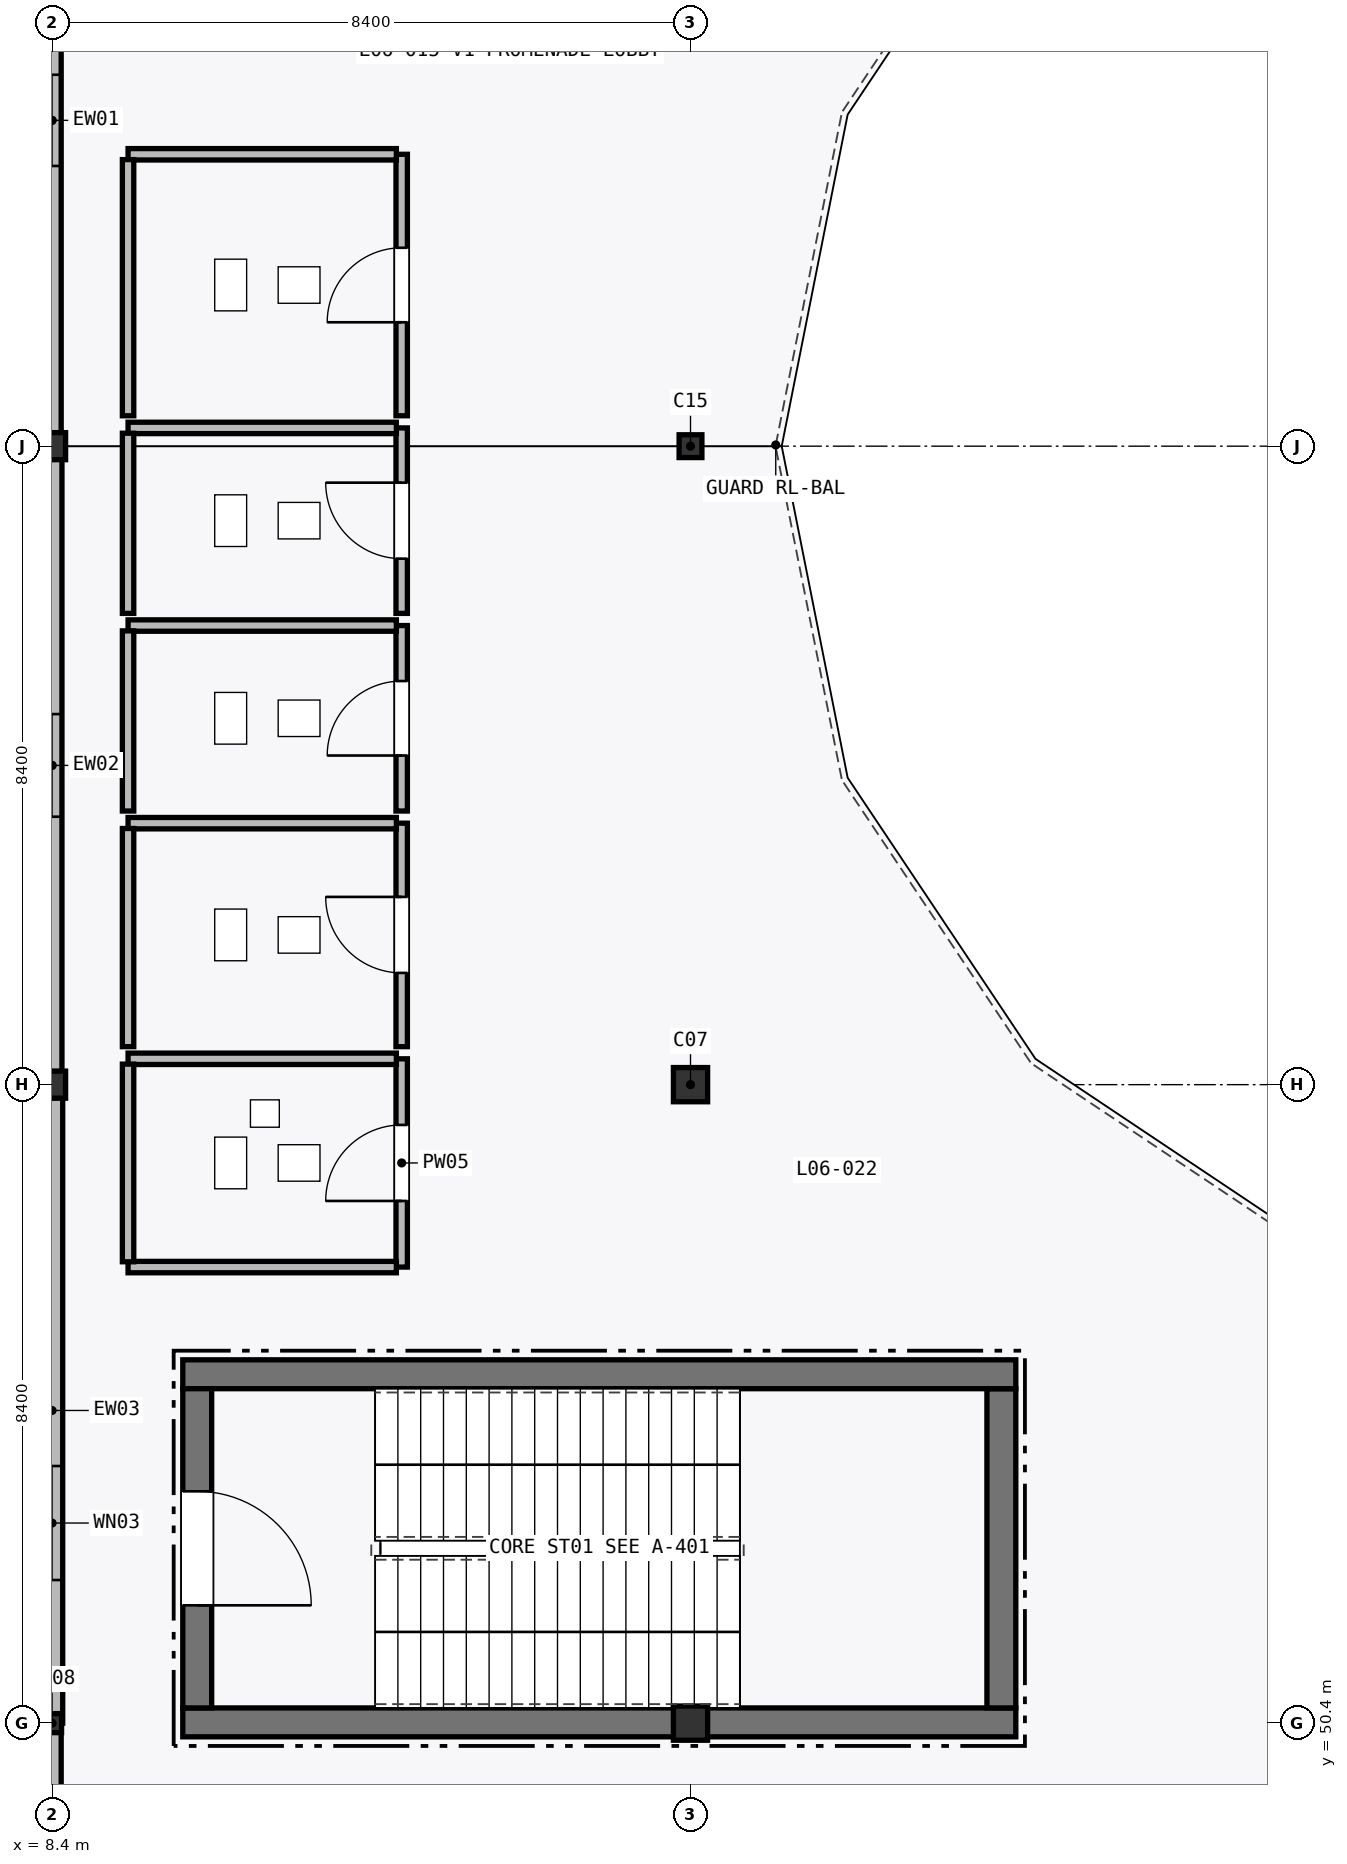
"""IFC4 building model, lengths in metres.
Left out: names, types, materials, properties, quantities, classifications, styles, units other than length and angle.
Written with IfcOpenShell. Run it as: python <this file> out.ifc"""

import sys

from ifc_helpers import new_model, si_unit, direction, frame, frame_2d, origin, origin_2d, place, context, subcontext, project, spatial, rectangle, hollow_rectangle, hollow_circle, i_section, extrude, element, fill, save


model = new_model("IFC4")
c1 = context("Model", 3, precision=1e-05, world=origin(), true_north=direction((0.0, 1.0)))
c2 = subcontext(c1, "Body", "Model", "MODEL_VIEW")
j1 = project(units=[si_unit("LENGTHUNIT", "METRE"), si_unit("PLANEANGLEUNIT", "RADIAN")], contexts=[c1])
p1 = place(None, origin())
s1 = spatial("IfcSite", under=j1, at=p1, CompositionType="ELEMENT")
p2 = place(p1, origin())
s2 = spatial("IfcBuilding", under=s1, at=p2, CompositionType="ELEMENT")
p3 = place(p2, frame((0.0, 0.0, 26.7)))
s3 = spatial("IfcBuildingStorey", under=s2, at=p3, CompositionType="ELEMENT", Elevation=26.7)
p4 = place(p3, frame((8.4, 50.4, 0.0), z_axis=(0.0, 0.0, 1.0), x_axis=(1.0, 0.0, 0.0)))
e1 = element("IfcColumn", 1, at=p4, inside=s3, PredefinedType="COLUMN", context=c2, shape_type="SweptSolid", body=[
    extrude(i_section(OverallWidth=0.25, OverallDepth=0.25, WebThickness=0.009, FlangeThickness=0.014, FilletRadius=0.016, at=origin_2d()), origin(), (0.0, 0.0, 1.0), 5.1),
])
for number, where, z_axis, x_axis in (
    (2, (8.4, 58.8, 0.0), (0.0, 0.0, 1.0), (1.0, 0.0, 0.0)),
    (3, (8.4, 67.2, 0.0), (0.0, 0.0, 1.0), (1.0, 0.0, 0.0)),
):
    element("IfcColumn", number, at=place(p3, frame(where, z_axis=z_axis, x_axis=x_axis)), inside=s3, PredefinedType="COLUMN", context=c2, shape_type="SweptSolid", body=[
        extrude(hollow_circle(Radius=0.178, WallThickness=0.014, at=origin_2d()), origin(), (0.0, 0.0, 1.0), 5.1),
    ])
for number, where, z_axis, x_axis in (
    (4, (16.8, 50.4, 0.0), (0.0, 0.0, 1.0), (1.0, 0.0, 0.0)),
    (5, (16.8, 58.8, 0.0), (0.0, 0.0, 1.0), (1.0, 0.0, 0.0)),
):
    element("IfcColumn", number, at=place(p3, frame(where, z_axis=z_axis, x_axis=x_axis)), inside=s3, PredefinedType="COLUMN", context=c2, shape_type="SweptSolid", body=[
        extrude(hollow_rectangle(XDim=0.45, YDim=0.45, WallThickness=0.018, at=origin_2d()), origin(), (0.0, 0.0, 1.0), 5.1),
    ])
p5 = place(p3, frame((16.8, 67.2, 0.0), z_axis=(0.0, 0.0, 1.0), x_axis=(1.0, 0.0, 0.0)))
e6 = element("IfcColumn", 6, at=p5, inside=s3, PredefinedType="COLUMN", context=c2, shape_type="SweptSolid", body=[
    extrude(i_section(OverallWidth=0.3, OverallDepth=0.3, WebThickness=0.01, FlangeThickness=0.015, FilletRadius=0.018, at=origin_2d()), origin(), (0.0, 0.0, 1.0), 5.1),
])
p6 = place(p3, frame((8.4, 75.6, 0.0), z_axis=(0.0, 0.0, 1.0), x_axis=(0.0, -1.0, 0.0)))
e7 = element("IfcWall", 7, at=p6, inside=s3, PredefinedType="STANDARD", context=c2, shape_type="SweptSolid", body=[
    extrude(rectangle(XDim=8.227, YDim=0.24, at=frame_2d((4.114, 0.0))), origin(), (0.0, 0.0, 1.0), 4.487),
])
p7 = place(p6, frame((3.513, 0.0, 0.95)))
e8 = element("IfcOpeningElement", 8, at=p7, cuts=e7, PredefinedType="OPENING", context=c2, shape_type="SweptSolid", body=[
    extrude(rectangle(XDim=1.2, YDim=1.8, at=frame_2d((0.6, 0.9))), frame((0.0, 0.13, 0.0), z_axis=(0.0, -1.0, 0.0), x_axis=(1.0, 0.0, 0.0)), (0.0, 0.0, 1.0), 0.26),
])
p8 = place(p3, frame((8.4, 67.027, 0.0), z_axis=(0.0, 0.0, 1.0), x_axis=(0.0, -1.0, 0.0)))
e9 = element("IfcWall", 9, at=p8, inside=s3, PredefinedType="STANDARD", context=c2, shape_type="SweptSolid", body=[
    extrude(rectangle(XDim=8.054, YDim=0.26, at=frame_2d((4.027, 0.0))), origin(), (0.0, 0.0, 1.0), 4.487),
])
p9 = place(p8, frame((3.352, 0.0, 0.95)))
e10 = element("IfcOpeningElement", 10, at=p9, cuts=e9, PredefinedType="OPENING", context=c2, shape_type="SweptSolid", body=[
    extrude(rectangle(XDim=1.35, YDim=1.8, at=frame_2d((0.675, 0.9))), frame((0.0, 0.14, 0.0), z_axis=(0.0, -1.0, 0.0), x_axis=(1.0, 0.0, 0.0)), (0.0, 0.0, 1.0), 0.28),
])
p10 = place(p3, frame((8.4, 58.627, 0.0), z_axis=(0.0, 0.0, 1.0), x_axis=(0.0, -1.0, 0.0)))
e11 = element("IfcWall", 11, at=p10, inside=s3, PredefinedType="STANDARD", context=c2, shape_type="SweptSolid", body=[
    extrude(rectangle(XDim=8.227, YDim=0.28, at=frame_2d((4.114, 0.0))), origin(), (0.0, 0.0, 1.0), 4.487),
])
p11 = place(p10, frame((4.844, 0.0, 0.95)))
e12 = element("IfcOpeningElement", 12, at=p11, cuts=e11, PredefinedType="OPENING", context=c2, shape_type="SweptSolid", body=[
    extrude(rectangle(XDim=1.5, YDim=1.8, at=frame_2d((0.75, 0.9))), frame((0.0, 0.15, 0.0), z_axis=(0.0, -1.0, 0.0), x_axis=(1.0, 0.0, 0.0)), (0.0, 0.0, 1.0), 0.3),
])
p12 = place(p3, frame((8.4, 50.4, 0.0), z_axis=(0.0, 0.0, 1.0), x_axis=(0.0, -1.0, 0.0)))
e13 = element("IfcWall", 13, at=p12, inside=s3, PredefinedType="STANDARD", context=c2, shape_type="SweptSolid", body=[
    extrude(rectangle(XDim=8.227, YDim=0.24, at=frame_2d((4.113, 0.0))), origin(), (0.0, 0.0, 1.0), 4.487),
])
p13 = place(p12, frame((3.273, 0.0, 0.95)))
e14 = element("IfcOpeningElement", 14, at=p13, cuts=e13, PredefinedType="OPENING", context=c2, shape_type="SweptSolid", body=[
    extrude(rectangle(XDim=1.68, YDim=1.8, at=frame_2d((0.84, 0.9))), frame((0.0, 0.13, 0.0), z_axis=(0.0, -1.0, 0.0), x_axis=(1.0, 0.0, 0.0)), (0.0, 0.0, 1.0), 0.26),
])
p14 = place(p3, frame((10.12, 50.41, 0.0), z_axis=(0.0, 0.0, 1.0), x_axis=(1.0, 0.0, 0.0)))
e15 = element("IfcWall", 15, at=p14, inside=s3, PredefinedType="SHEAR", context=c2, shape_type="SweptSolid", body=[
    extrude(rectangle(XDim=10.96, YDim=0.38, at=frame_2d((5.48, 0.0))), origin(), (0.0, 0.0, 1.0), 4.845),
])
p15 = place(p3, frame((20.89, 50.6, 0.0), z_axis=(0.0, 0.0, 1.0), x_axis=(0.0, 1.0, 0.0)))
e16 = element("IfcWall", 16, at=p15, inside=s3, PredefinedType="SHEAR", context=c2, shape_type="SweptSolid", body=[
    extrude(rectangle(XDim=4.2, YDim=0.38, at=frame_2d((2.1, 0.0))), origin(), (0.0, 0.0, 1.0), 4.845),
])
p16 = place(p3, frame((21.08, 54.99, 0.0), z_axis=(0.0, 0.0, 1.0), x_axis=(-1.0, 0.0, 0.0)))
e17 = element("IfcWall", 17, at=p16, inside=s3, PredefinedType="SHEAR", context=c2, shape_type="SweptSolid", body=[
    extrude(rectangle(XDim=10.96, YDim=0.38, at=frame_2d((5.48, 0.0))), origin(), (0.0, 0.0, 1.0), 4.845),
])
p17 = place(p3, frame((10.31, 54.8, 0.0), z_axis=(0.0, 0.0, 1.0), x_axis=(0.0, -1.0, 0.0)))
e18 = element("IfcWall", 18, at=p17, inside=s3, PredefinedType="SHEAR", context=c2, shape_type="SweptSolid", body=[
    extrude(rectangle(XDim=4.2, YDim=0.38, at=frame_2d((2.1, 0.0))), origin(), (0.0, 0.0, 1.0), 4.845),
])
p18 = place(p17, frame((1.35, 0.0, 0.0)))
e19 = element("IfcOpeningElement", 19, at=p18, cuts=e18, PredefinedType="OPENING", context=c2, shape_type="SweptSolid", body=[
    extrude(rectangle(XDim=1.5, YDim=2.15, at=frame_2d((0.75, 1.075))), frame((0.0, 0.2, 0.0), z_axis=(0.0, -1.0, 0.0), x_axis=(1.0, 0.0, 0.0)), (0.0, 0.0, 1.0), 0.4),
])
p19 = place(p3, frame((13.0, 56.4, 0.0), z_axis=(0.0, 0.0, 1.0), x_axis=(0.0, 1.0, 0.0)))
e20 = element("IfcWall", 20, at=p19, inside=s3, PredefinedType="PARTITIONING", context=c2, shape_type="SweptSolid", body=[
    extrude(rectangle(XDim=2.74, YDim=0.15, at=frame_2d((1.37, 0.0))), origin(), (0.0, 0.0, 1.0), 4.845),
])
p20 = place(p19, frame((0.87, 0.0, 0.0)))
e21 = element("IfcOpeningElement", 21, at=p20, cuts=e20, PredefinedType="OPENING", context=c2, shape_type="SweptSolid", body=[
    extrude(rectangle(XDim=1.0, YDim=2.1, at=frame_2d((0.5, 1.05))), frame((0.0, 0.085, 0.0), z_axis=(0.0, -1.0, 0.0), x_axis=(1.0, 0.0, 0.0)), (0.0, 0.0, 1.0), 0.17),
])
p21 = place(p3, frame((9.4, 56.4, 0.0), z_axis=(0.0, 0.0, 1.0), x_axis=(1.0, 0.0, 0.0)))
e22 = element("IfcWall", 22, at=p21, inside=s3, PredefinedType="PARTITIONING", context=c2, shape_type="SweptSolid", body=[
    extrude(rectangle(XDim=3.53, YDim=0.15, at=frame_2d((1.765, 0.0))), origin(), (0.0, 0.0, 1.0), 4.845),
])
p22 = place(p3, frame((12.93, 59.14, 0.0), z_axis=(0.0, 0.0, 1.0), x_axis=(-1.0, 0.0, 0.0)))
e23 = element("IfcWall", 23, at=p22, inside=s3, PredefinedType="PARTITIONING", context=c2, shape_type="SweptSolid", body=[
    extrude(rectangle(XDim=3.53, YDim=0.15, at=frame_2d((1.765, 0.0))), origin(), (0.0, 0.0, 1.0), 4.045),
])
p23 = place(p3, frame((9.4, 59.07, 0.0), z_axis=(0.0, 0.0, 1.0), x_axis=(0.0, -1.0, 0.0)))
e24 = element("IfcWall", 24, at=p23, inside=s3, PredefinedType="PARTITIONING", context=c2, shape_type="SweptSolid", body=[
    extrude(rectangle(XDim=2.6, YDim=0.15, at=frame_2d((1.3, 0.0))), origin(), (0.0, 0.0, 1.0), 4.845),
])
p24 = place(p3, frame((13.0, 59.3, 0.0), z_axis=(0.0, 0.0, 1.0), x_axis=(0.0, 1.0, 0.0)))
e25 = element("IfcWall", 25, at=p24, inside=s3, PredefinedType="PARTITIONING", context=c2, shape_type="SweptSolid", body=[
    extrude(rectangle(XDim=2.94, YDim=0.15, at=frame_2d((1.47, 0.0))), origin(), (0.0, 0.0, 1.0), 4.845),
])
p25 = place(p24, frame((0.97, 0.0, 0.0)))
e26 = element("IfcOpeningElement", 26, at=p25, cuts=e25, PredefinedType="OPENING", context=c2, shape_type="SweptSolid", body=[
    extrude(rectangle(XDim=1.0, YDim=2.1, at=frame_2d((0.5, 1.05))), frame((0.0, 0.085, 0.0), z_axis=(0.0, -1.0, 0.0), x_axis=(1.0, 0.0, 0.0)), (0.0, 0.0, 1.0), 0.17),
])
p26 = place(p3, frame((12.93, 62.24, 0.0), z_axis=(0.0, 0.0, 1.0), x_axis=(-1.0, 0.0, 0.0)))
e27 = element("IfcWall", 27, at=p26, inside=s3, PredefinedType="PARTITIONING", context=c2, shape_type="SweptSolid", body=[
    extrude(rectangle(XDim=3.53, YDim=0.15, at=frame_2d((1.765, 0.0))), origin(), (0.0, 0.0, 1.0), 4.845),
])
p27 = place(p3, frame((9.4, 62.17, 0.0), z_axis=(0.0, 0.0, 1.0), x_axis=(0.0, -1.0, 0.0)))
e28 = element("IfcWall", 28, at=p27, inside=s3, PredefinedType="PARTITIONING", context=c2, shape_type="SweptSolid", body=[
    extrude(rectangle(XDim=2.87, YDim=0.15, at=frame_2d((1.435, 0.0))), origin(), (0.0, 0.0, 1.0), 4.845),
])
p28 = place(p3, frame((13.0, 62.4, 0.0), z_axis=(0.0, 0.0, 1.0), x_axis=(0.0, 1.0, 0.0)))
e29 = element("IfcWall", 29, at=p28, inside=s3, PredefinedType="PARTITIONING", context=c2, shape_type="SweptSolid", body=[
    extrude(rectangle(XDim=2.44, YDim=0.15, at=frame_2d((1.22, 0.0))), origin(), (0.0, 0.0, 1.0), 4.845),
])
p29 = place(p28, frame((0.73, 0.0, 0.0)))
e30 = element("IfcOpeningElement", 30, at=p29, cuts=e29, PredefinedType="OPENING", context=c2, shape_type="SweptSolid", body=[
    extrude(rectangle(XDim=0.98, YDim=2.1, at=frame_2d((0.49, 1.05))), frame((0.0, 0.085, 0.0), z_axis=(0.0, -1.0, 0.0), x_axis=(1.0, 0.0, 0.0)), (0.0, 0.0, 1.0), 0.17),
])
p30 = place(p3, frame((12.93, 64.84, 0.0), z_axis=(0.0, 0.0, 1.0), x_axis=(-1.0, 0.0, 0.0)))
e31 = element("IfcWall", 31, at=p30, inside=s3, PredefinedType="PARTITIONING", context=c2, shape_type="SweptSolid", body=[
    extrude(rectangle(XDim=3.53, YDim=0.15, at=frame_2d((1.765, 0.0))), origin(), (0.0, 0.0, 1.0), 4.845),
])
p31 = place(p3, frame((9.4, 64.77, 0.0), z_axis=(0.0, 0.0, 1.0), x_axis=(0.0, -1.0, 0.0)))
e32 = element("IfcWall", 32, at=p31, inside=s3, PredefinedType="PARTITIONING", context=c2, shape_type="SweptSolid", body=[
    extrude(rectangle(XDim=2.37, YDim=0.15, at=frame_2d((1.185, 0.0))), origin(), (0.0, 0.0, 1.0), 4.845),
])
p32 = place(p3, frame((13.0, 65.0, 0.0), z_axis=(0.0, 0.0, 1.0), x_axis=(0.0, 1.0, 0.0)))
e33 = element("IfcWall", 33, at=p32, inside=s3, PredefinedType="PARTITIONING", context=c2, shape_type="SweptSolid", body=[
    extrude(rectangle(XDim=2.44, YDim=0.15, at=frame_2d((1.22, 0.0))), origin(), (0.0, 0.0, 1.0), 4.845),
])
p33 = place(p32, frame((0.72, 0.0, 0.0)))
e34 = element("IfcOpeningElement", 34, at=p33, cuts=e33, PredefinedType="OPENING", context=c2, shape_type="SweptSolid", body=[
    extrude(rectangle(XDim=1.0, YDim=2.1, at=frame_2d((0.5, 1.05))), frame((0.0, 0.085, 0.0), z_axis=(0.0, -1.0, 0.0), x_axis=(1.0, 0.0, 0.0)), (0.0, 0.0, 1.0), 0.17),
])
p34 = place(p3, frame((12.93, 67.44, 0.0), z_axis=(0.0, 0.0, 1.0), x_axis=(-1.0, 0.0, 0.0)))
e35 = element("IfcWall", 35, at=p34, inside=s3, PredefinedType="PARTITIONING", context=c2, shape_type="SweptSolid", body=[
    extrude(rectangle(XDim=3.53, YDim=0.15, at=frame_2d((1.765, 0.0))), origin(), (0.0, 0.0, 1.0), 4.241),
])
p35 = place(p3, frame((9.4, 67.37, 0.0), z_axis=(0.0, 0.0, 1.0), x_axis=(0.0, -1.0, 0.0)))
e36 = element("IfcWall", 36, at=p35, inside=s3, PredefinedType="PARTITIONING", context=c2, shape_type="SweptSolid", body=[
    extrude(rectangle(XDim=2.37, YDim=0.15, at=frame_2d((1.185, 0.0))), origin(), (0.0, 0.0, 1.0), 4.845),
])
p36 = place(p3, frame((13.0, 67.6, 0.0), z_axis=(0.0, 0.0, 1.0), x_axis=(0.0, 1.0, 0.0)))
e37 = element("IfcWall", 37, at=p36, inside=s3, PredefinedType="PARTITIONING", context=c2, shape_type="SweptSolid", body=[
    extrude(rectangle(XDim=3.44, YDim=0.15, at=frame_2d((1.72, 0.0))), origin(), (0.0, 0.0, 1.0), 4.845),
])
p37 = place(p36, frame((1.23, 0.0, 0.0)))
e38 = element("IfcOpeningElement", 38, at=p37, cuts=e37, PredefinedType="OPENING", context=c2, shape_type="SweptSolid", body=[
    extrude(rectangle(XDim=0.98, YDim=2.1, at=frame_2d((0.49, 1.05))), frame((0.0, 0.085, 0.0), z_axis=(0.0, -1.0, 0.0), x_axis=(1.0, 0.0, 0.0)), (0.0, 0.0, 1.0), 0.17),
])
p38 = place(p3, frame((12.93, 71.04, 0.0), z_axis=(0.0, 0.0, 1.0), x_axis=(-1.0, 0.0, 0.0)))
e39 = element("IfcWall", 39, at=p38, inside=s3, PredefinedType="PARTITIONING", context=c2, shape_type="SweptSolid", body=[
    extrude(rectangle(XDim=3.53, YDim=0.15, at=frame_2d((1.765, 0.0))), origin(), (0.0, 0.0, 1.0), 4.845),
])
p39 = place(p3, frame((9.4, 70.97, 0.0), z_axis=(0.0, 0.0, 1.0), x_axis=(0.0, -1.0, 0.0)))
e40 = element("IfcWall", 40, at=p39, inside=s3, PredefinedType="PARTITIONING", context=c2, shape_type="SweptSolid", body=[
    extrude(rectangle(XDim=3.37, YDim=0.15, at=frame_2d((1.685, 0.0))), origin(), (0.0, 0.0, 1.0), 4.845),
])
p40 = place(p7, origin())
e41 = element("IfcWindow", 41, at=p40, inside=s3, PartitioningType="SINGLE_PANEL", PredefinedType="WINDOW", context=c2, shape_type="SweptSolid", body=[
    extrude(rectangle(XDim=1.2, YDim=1.8, at=frame_2d((0.6, 0.9))), frame((0.0, 0.03, 0.0), z_axis=(0.0, -1.0, 0.0), x_axis=(1.0, 0.0, 0.0)), (0.0, 0.0, 1.0), 0.06),
])
fill(e8, e41)
p41 = place(p9, origin())
e42 = element("IfcWindow", 42, at=p41, inside=s3, PartitioningType="SINGLE_PANEL", PredefinedType="WINDOW", context=c2, shape_type="SweptSolid", body=[
    extrude(rectangle(XDim=1.35, YDim=1.8, at=frame_2d((0.675, 0.9))), frame((0.0, 0.03, 0.0), z_axis=(0.0, -1.0, 0.0), x_axis=(1.0, 0.0, 0.0)), (0.0, 0.0, 1.0), 0.06),
])
fill(e10, e42)
p42 = place(p11, origin())
e43 = element("IfcWindow", 43, at=p42, inside=s3, PartitioningType="SINGLE_PANEL", PredefinedType="WINDOW", context=c2, shape_type="SweptSolid", body=[
    extrude(rectangle(XDim=1.5, YDim=1.8, at=frame_2d((0.75, 0.9))), frame((0.0, 0.03, 0.0), z_axis=(0.0, -1.0, 0.0), x_axis=(1.0, 0.0, 0.0)), (0.0, 0.0, 1.0), 0.06),
])
fill(e12, e43)
p43 = place(p18, origin())
e44 = element("IfcDoor", 44, at=p43, inside=s3, OperationType="SINGLE_SWING_RIGHT", PredefinedType="DOOR", context=c2, shape_type="SweptSolid", body=[
    extrude(rectangle(XDim=1.5, YDim=2.15, at=frame_2d((0.75, 1.075))), frame((0.0, 0.025, 0.0), z_axis=(0.0, -1.0, 0.0), x_axis=(1.0, 0.0, 0.0)), (0.0, 0.0, 1.0), 0.05),
])
fill(e19, e44)
p44 = place(p20, origin())
e45 = element("IfcDoor", 45, at=p44, inside=s3, OperationType="SINGLE_SWING_LEFT", PredefinedType="DOOR", context=c2, shape_type="SweptSolid", body=[
    extrude(rectangle(XDim=1.0, YDim=2.1, at=frame_2d((0.5, 1.05))), frame((0.0, 0.025, 0.0), z_axis=(0.0, -1.0, 0.0), x_axis=(1.0, 0.0, 0.0)), (0.0, 0.0, 1.0), 0.05),
])
fill(e21, e45)
p45 = place(p25, origin())
e46 = element("IfcDoor", 46, at=p45, inside=s3, OperationType="SINGLE_SWING_RIGHT", PredefinedType="DOOR", context=c2, shape_type="SweptSolid", body=[
    extrude(rectangle(XDim=1.0, YDim=2.1, at=frame_2d((0.5, 1.05))), frame((0.0, 0.025, 0.0), z_axis=(0.0, -1.0, 0.0), x_axis=(1.0, 0.0, 0.0)), (0.0, 0.0, 1.0), 0.05),
])
fill(e26, e46)
p46 = place(p29, origin())
e47 = element("IfcDoor", 47, at=p46, inside=s3, OperationType="SINGLE_SWING_LEFT", PredefinedType="DOOR", context=c2, shape_type="SweptSolid", body=[
    extrude(rectangle(XDim=0.98, YDim=2.1, at=frame_2d((0.49, 1.05))), frame((0.0, 0.025, 0.0), z_axis=(0.0, -1.0, 0.0), x_axis=(1.0, 0.0, 0.0)), (0.0, 0.0, 1.0), 0.05),
])
fill(e30, e47)
p47 = place(p33, origin())
e48 = element("IfcDoor", 48, at=p47, inside=s3, OperationType="SINGLE_SWING_RIGHT", PredefinedType="DOOR", context=c2, shape_type="SweptSolid", body=[
    extrude(rectangle(XDim=1.0, YDim=2.1, at=frame_2d((0.5, 1.05))), frame((0.0, 0.025, 0.0), z_axis=(0.0, -1.0, 0.0), x_axis=(1.0, 0.0, 0.0)), (0.0, 0.0, 1.0), 0.05),
])
fill(e34, e48)
p48 = place(p37, origin())
e49 = element("IfcDoor", 49, at=p48, inside=s3, OperationType="SINGLE_SWING_LEFT", PredefinedType="DOOR", context=c2, shape_type="SweptSolid", body=[
    extrude(rectangle(XDim=0.98, YDim=2.1, at=frame_2d((0.49, 1.05))), frame((0.0, 0.025, 0.0), z_axis=(0.0, -1.0, 0.0), x_axis=(1.0, 0.0, 0.0)), (0.0, 0.0, 1.0), 0.05),
])
fill(e38, e49)
save(model, sys.argv[1])
